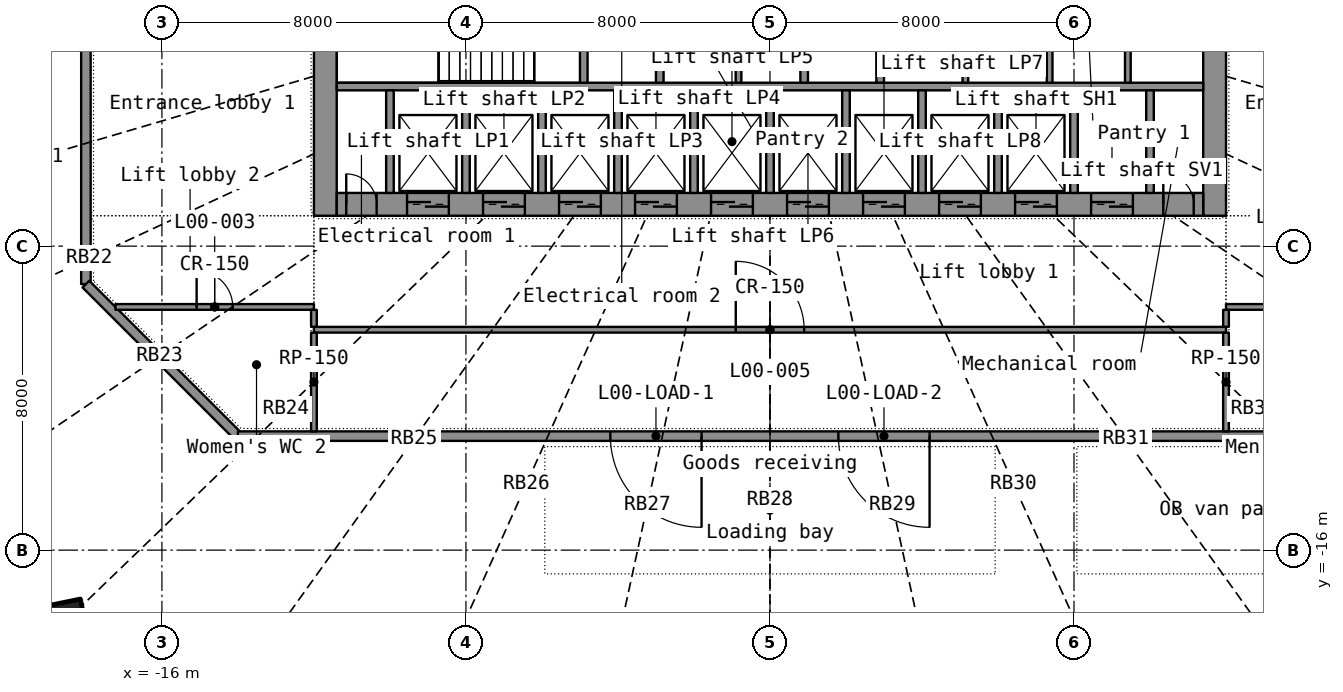
"""IFC4 building model, lengths in metres.
Left out: names, types, materials, properties, quantities, classifications, styles, units other than length and angle.
Written with IfcOpenShell. Run it as: python <this file> out.ifc"""

import sys

from ifc_helpers import new_model, si_unit, direction, frame, frame_2d, origin, origin_2d, place, context, subcontext, project, spatial, rectangle, hollow_rectangle, extrude, element, fill, save


model = new_model("IFC4")
c1 = context("Model", 3, precision=1e-05, world=origin(), true_north=direction((0.0, 1.0)))
c2 = subcontext(c1, "Body", "Model", "MODEL_VIEW")
j1 = project(units=[si_unit("LENGTHUNIT", "METRE"), si_unit("PLANEANGLEUNIT", "RADIAN")], contexts=[c1])
p1 = place(None, origin())
s1 = spatial("IfcSite", under=j1, at=p1, CompositionType="ELEMENT")
p2 = place(p1, origin())
s2 = spatial("IfcBuilding", under=s1, at=p2, CompositionType="ELEMENT")
p3 = place(p2, origin())
s3 = spatial("IfcBuildingStorey", under=s2, at=p3, CompositionType="ELEMENT", Elevation=0.0)
p4 = place(p3, frame((-18.536, -17.878, 0.0), z_axis=(0.022240937, 0.021683171, 0.999517474), x_axis=(-0.827084796, 0.562042845, 0.006211267)))
e1 = element("IfcColumn", 1, at=p4, inside=s3, PredefinedType="COLUMN", context=c2, shape_type="SweptSolid", body=[
    extrude(hollow_rectangle(XDim=1.0, YDim=1.0, WallThickness=0.032, at=origin_2d()), origin(), (0.0, 0.0, 1.0), 7.003),
])
p5 = place(p3, frame((-18.0, -9.0, 0.0), z_axis=(0.0, 0.0, 1.0), x_axis=(0.0, 1.0, 0.0)))
e2 = element("IfcWall", 2, at=p5, inside=s3, PredefinedType="STANDARD", context=c2, shape_type="SweptSolid", body=[
    extrude(rectangle(XDim=18.0, YDim=0.25, at=frame_2d((9.0, 0.0))), origin(), (0.0, 0.0, 1.0), 6.6),
])
p6 = place(p5, frame((7.9, 0.0, 0.0)))
e3 = element("IfcOpeningElement", 3, at=p6, cuts=e2, PredefinedType="OPENING", context=c2, shape_type="SweptSolid", body=[
    extrude(rectangle(XDim=2.2, YDim=2.4, at=frame_2d((1.1, 1.2))), frame((0.0, 0.135, 0.0), z_axis=(0.0, -1.0, 0.0), x_axis=(1.0, 0.0, 0.0)), (0.0, 0.0, 1.0), 0.27),
])
p7 = place(p3, frame((-14.0, -13.0, 0.0), z_axis=(0.0, 0.0, 1.0), x_axis=(-0.707106781, 0.707106781, 0.0)))
e4 = element("IfcWall", 4, at=p7, inside=s3, PredefinedType="STANDARD", context=c2, shape_type="SweptSolid", body=[
    extrude(rectangle(XDim=5.657, YDim=0.25, at=frame_2d((2.828, 0.0))), origin(), (0.0, 0.0, 1.0), 6.6),
])
p8 = place(p3, frame((14.0, -13.0, 0.0), z_axis=(0.0, 0.0, 1.0), x_axis=(-1.0, 0.0, 0.0)))
e5 = element("IfcWall", 5, at=p8, inside=s3, PredefinedType="STANDARD", context=c2, shape_type="SweptSolid", body=[
    extrude(rectangle(XDim=28.0, YDim=0.25, at=frame_2d((14.0, 0.0))), origin(), (0.0, 0.0, 1.0), 6.6),
])
p9 = place(p8, frame((15.8, 0.0, 0.0)))
e6 = element("IfcOpeningElement", 6, at=p9, cuts=e5, PredefinedType="OPENING", context=c2, shape_type="SweptSolid", body=[
    extrude(rectangle(XDim=2.4, YDim=3.0, at=frame_2d((1.2, 1.5))), frame((0.0, 0.135, 0.0), z_axis=(0.0, -1.0, 0.0), x_axis=(1.0, 0.0, 0.0)), (0.0, 0.0, 1.0), 0.27),
])
p10 = place(p8, frame((9.8, 0.0, 0.0)))
e7 = element("IfcOpeningElement", 7, at=p10, cuts=e5, PredefinedType="OPENING", context=c2, shape_type="SweptSolid", body=[
    extrude(rectangle(XDim=2.4, YDim=3.0, at=frame_2d((1.2, 1.5))), frame((0.0, 0.135, 0.0), z_axis=(0.0, -1.0, 0.0), x_axis=(1.0, 0.0, 0.0)), (0.0, 0.0, 1.0), 0.27),
])
p11 = place(p3, frame((-11.7, -7.2, 0.0), z_axis=(0.0, 0.0, 1.0), x_axis=(0.0, 1.0, 0.0)))
e8 = element("IfcWall", 8, at=p11, inside=s3, PredefinedType="SHEAR", context=c2, shape_type="SweptSolid", body=[
    extrude(rectangle(XDim=14.4, YDim=0.6, at=frame_2d((7.2, 0.0))), origin(), (0.0, 0.0, 1.0), 6.6),
])
p12 = place(p11, frame((6.5, 0.0, 0.0)))
e9 = element("IfcOpeningElement", 9, at=p12, cuts=e8, PredefinedType="OPENING", context=c2, shape_type="SweptSolid", body=[
    extrude(rectangle(XDim=1.4, YDim=2.2, at=frame_2d((0.7, 1.1))), frame((0.0, 0.31, 0.0), z_axis=(0.0, -1.0, 0.0), x_axis=(1.0, 0.0, 0.0)), (0.0, 0.0, 1.0), 0.62),
])
p13 = place(p3, frame((11.7, -7.2, 0.0), z_axis=(0.0, 0.0, 1.0), x_axis=(0.0, 1.0, 0.0)))
e10 = element("IfcWall", 10, at=p13, inside=s3, PredefinedType="SHEAR", context=c2, shape_type="SweptSolid", body=[
    extrude(rectangle(XDim=14.4, YDim=0.6, at=frame_2d((7.2, 0.0))), origin(), (0.0, 0.0, 1.0), 6.6),
])
p14 = place(p13, frame((6.5, 0.0, 0.0)))
e11 = element("IfcOpeningElement", 11, at=p14, cuts=e10, PredefinedType="OPENING", context=c2, shape_type="SweptSolid", body=[
    extrude(rectangle(XDim=1.4, YDim=2.2, at=frame_2d((0.7, 1.1))), frame((0.0, 0.31, 0.0), z_axis=(0.0, -1.0, 0.0), x_axis=(1.0, 0.0, 0.0)), (0.0, 0.0, 1.0), 0.62),
])
p15 = place(p3, frame((-11.4, -6.9, 0.0), z_axis=(0.0, 0.0, 1.0), x_axis=(1.0, 0.0, 0.0)))
e12 = element("IfcWall", 12, at=p15, inside=s3, PredefinedType="SHEAR", context=c2, shape_type="SweptSolid", body=[
    extrude(rectangle(XDim=22.8, YDim=0.6, at=frame_2d((11.4, 0.0))), origin(), (0.0, 0.0, 1.0), 6.6),
])
p16 = place(p15, frame((1.85, 0.0, 0.0)))
e13 = element("IfcOpeningElement", 13, at=p16, cuts=e12, PredefinedType="OPENING", context=c2, shape_type="SweptSolid", body=[
    extrude(rectangle(XDim=1.1, YDim=2.2, at=frame_2d((0.55, 1.1))), frame((0.0, 0.31, 0.0), z_axis=(0.0, -1.0, 0.0), x_axis=(1.0, 0.0, 0.0)), (0.0, 0.0, 1.0), 0.62),
])
p17 = place(p15, frame((3.85, 0.0, 0.0)))
e14 = element("IfcOpeningElement", 14, at=p17, cuts=e12, PredefinedType="OPENING", context=c2, shape_type="SweptSolid", body=[
    extrude(rectangle(XDim=1.1, YDim=2.2, at=frame_2d((0.55, 1.1))), frame((0.0, 0.31, 0.0), z_axis=(0.0, -1.0, 0.0), x_axis=(1.0, 0.0, 0.0)), (0.0, 0.0, 1.0), 0.62),
])
p18 = place(p15, frame((5.85, 0.0, 0.0)))
e15 = element("IfcOpeningElement", 15, at=p18, cuts=e12, PredefinedType="OPENING", context=c2, shape_type="SweptSolid", body=[
    extrude(rectangle(XDim=1.1, YDim=2.2, at=frame_2d((0.55, 1.1))), frame((0.0, 0.31, 0.0), z_axis=(0.0, -1.0, 0.0), x_axis=(1.0, 0.0, 0.0)), (0.0, 0.0, 1.0), 0.62),
])
p19 = place(p15, frame((7.85, 0.0, 0.0)))
e16 = element("IfcOpeningElement", 16, at=p19, cuts=e12, PredefinedType="OPENING", context=c2, shape_type="SweptSolid", body=[
    extrude(rectangle(XDim=1.1, YDim=2.2, at=frame_2d((0.55, 1.1))), frame((0.0, 0.31, 0.0), z_axis=(0.0, -1.0, 0.0), x_axis=(1.0, 0.0, 0.0)), (0.0, 0.0, 1.0), 0.62),
])
p20 = place(p15, frame((9.85, 0.0, 0.0)))
e17 = element("IfcOpeningElement", 17, at=p20, cuts=e12, PredefinedType="OPENING", context=c2, shape_type="SweptSolid", body=[
    extrude(rectangle(XDim=1.1, YDim=2.2, at=frame_2d((0.55, 1.1))), frame((0.0, 0.31, 0.0), z_axis=(0.0, -1.0, 0.0), x_axis=(1.0, 0.0, 0.0)), (0.0, 0.0, 1.0), 0.62),
])
p21 = place(p15, frame((11.85, 0.0, 0.0)))
e18 = element("IfcOpeningElement", 18, at=p21, cuts=e12, PredefinedType="OPENING", context=c2, shape_type="SweptSolid", body=[
    extrude(rectangle(XDim=1.1, YDim=2.2, at=frame_2d((0.55, 1.1))), frame((0.0, 0.31, 0.0), z_axis=(0.0, -1.0, 0.0), x_axis=(1.0, 0.0, 0.0)), (0.0, 0.0, 1.0), 0.62),
])
p22 = place(p15, frame((13.85, 0.0, 0.0)))
e19 = element("IfcOpeningElement", 19, at=p22, cuts=e12, PredefinedType="OPENING", context=c2, shape_type="SweptSolid", body=[
    extrude(rectangle(XDim=1.1, YDim=2.2, at=frame_2d((0.55, 1.1))), frame((0.0, 0.31, 0.0), z_axis=(0.0, -1.0, 0.0), x_axis=(1.0, 0.0, 0.0)), (0.0, 0.0, 1.0), 0.62),
])
p23 = place(p15, frame((15.85, 0.0, 0.0)))
e20 = element("IfcOpeningElement", 20, at=p23, cuts=e12, PredefinedType="OPENING", context=c2, shape_type="SweptSolid", body=[
    extrude(rectangle(XDim=1.1, YDim=2.2, at=frame_2d((0.55, 1.1))), frame((0.0, 0.31, 0.0), z_axis=(0.0, -1.0, 0.0), x_axis=(1.0, 0.0, 0.0)), (0.0, 0.0, 1.0), 0.62),
])
p24 = place(p15, frame((17.85, 0.0, 0.0)))
e21 = element("IfcOpeningElement", 21, at=p24, cuts=e12, PredefinedType="OPENING", context=c2, shape_type="SweptSolid", body=[
    extrude(rectangle(XDim=1.1, YDim=2.2, at=frame_2d((0.55, 1.1))), frame((0.0, 0.31, 0.0), z_axis=(0.0, -1.0, 0.0), x_axis=(1.0, 0.0, 0.0)), (0.0, 0.0, 1.0), 0.62),
])
p25 = place(p15, frame((19.85, 0.0, 0.0)))
e22 = element("IfcOpeningElement", 22, at=p25, cuts=e12, PredefinedType="OPENING", context=c2, shape_type="SweptSolid", body=[
    extrude(rectangle(XDim=1.1, YDim=2.2, at=frame_2d((0.55, 1.1))), frame((0.0, 0.31, 0.0), z_axis=(0.0, -1.0, 0.0), x_axis=(1.0, 0.0, 0.0)), (0.0, 0.0, 1.0), 0.62),
])
p26 = place(p15, frame((0.25, 0.0, 0.0)))
e23 = element("IfcOpeningElement", 23, at=p26, cuts=e12, PredefinedType="OPENING", context=c2, shape_type="SweptSolid", body=[
    extrude(rectangle(XDim=0.8, YDim=2.05, at=frame_2d((0.4, 1.025))), frame((0.0, 0.31, 0.0), z_axis=(0.0, -1.0, 0.0), x_axis=(1.0, 0.0, 0.0)), (0.0, 0.0, 1.0), 0.62),
])
p27 = place(p15, frame((21.75, 0.0, 0.0)))
e24 = element("IfcOpeningElement", 24, at=p27, cuts=e12, PredefinedType="OPENING", context=c2, shape_type="SweptSolid", body=[
    extrude(rectangle(XDim=0.8, YDim=2.05, at=frame_2d((0.4, 1.025))), frame((0.0, 0.31, 0.0), z_axis=(0.0, -1.0, 0.0), x_axis=(1.0, 0.0, 0.0)), (0.0, 0.0, 1.0), 0.62),
])
p28 = place(p3, frame((-11.4, -3.8, 0.0), z_axis=(0.0, 0.0, 1.0), x_axis=(1.0, 0.0, 0.0)))
e25 = element("IfcWall", 25, at=p28, inside=s3, PredefinedType="SHEAR", context=c2, shape_type="SweptSolid", body=[
    extrude(rectangle(XDim=22.8, YDim=0.2, at=frame_2d((11.4, 0.0))), origin(), (0.0, 0.0, 1.0), 6.6),
])
for number, where, z_axis, x_axis in (
    (26, (-10.0, -6.6, 0.0), (0.0, 0.0, 1.0), (0.0, 1.0, 0.0)),
    (27, (-8.0, -6.6, 0.0), (0.0, 0.0, 1.0), (0.0, 1.0, 0.0)),
    (28, (-6.0, -6.6, 0.0), (0.0, 0.0, 1.0), (0.0, 1.0, 0.0)),
    (29, (-4.0, -6.6, 0.0), (0.0, 0.0, 1.0), (0.0, 1.0, 0.0)),
    (30, (-2.0, -6.6, 0.0), (0.0, 0.0, 1.0), (0.0, 1.0, 0.0)),
    (31, (0.0, -6.6, 0.0), (0.0, 0.0, 1.0), (0.0, 1.0, 0.0)),
    (32, (2.0, -6.6, 0.0), (0.0, 0.0, 1.0), (0.0, 1.0, 0.0)),
    (33, (4.0, -6.6, 0.0), (0.0, 0.0, 1.0), (0.0, 1.0, 0.0)),
    (34, (6.0, -6.6, 0.0), (0.0, 0.0, 1.0), (0.0, 1.0, 0.0)),
    (35, (8.0, -6.6, 0.0), (0.0, 0.0, 1.0), (0.0, 1.0, 0.0)),
    (36, (10.0, -6.6, 0.0), (0.0, 0.0, 1.0), (0.0, 1.0, 0.0)),
):
    element("IfcWall", number, at=place(p3, frame(where, z_axis=z_axis, x_axis=x_axis)), inside=s3, PredefinedType="SHEAR", context=c2, shape_type="SweptSolid", body=[
        extrude(rectangle(XDim=2.7, YDim=0.2, at=frame_2d((1.35, 0.0))), origin(), (0.0, 0.0, 1.0), 6.6),
    ])
p29 = place(p3, frame((-2.9, -3.7, 0.0), z_axis=(0.0, 0.0, 1.0), x_axis=(0.0, 1.0, 0.0)))
e37 = element("IfcWall", 37, at=p29, inside=s3, PredefinedType="SHEAR", context=c2, shape_type="SweptSolid", body=[
    extrude(rectangle(XDim=7.4, YDim=0.2, at=frame_2d((3.7, 0.0))), origin(), (0.0, 0.0, 1.0), 6.6),
])
p30 = place(p29, frame((3.1, 0.0, 0.0)))
e38 = element("IfcOpeningElement", 38, at=p30, cuts=e37, PredefinedType="OPENING", context=c2, shape_type="SweptSolid", body=[
    extrude(rectangle(XDim=1.2, YDim=2.2, at=frame_2d((0.6, 1.1))), frame((0.0, 0.11, 0.0), z_axis=(0.0, -1.0, 0.0), x_axis=(1.0, 0.0, 0.0)), (0.0, 0.0, 1.0), 0.22),
])
p31 = place(p3, frame((2.9, -3.7, 0.0), z_axis=(0.0, 0.0, 1.0), x_axis=(0.0, 1.0, 0.0)))
e39 = element("IfcWall", 39, at=p31, inside=s3, PredefinedType="SHEAR", context=c2, shape_type="SweptSolid", body=[
    extrude(rectangle(XDim=7.4, YDim=0.2, at=frame_2d((3.7, 0.0))), origin(), (0.0, 0.0, 1.0), 6.6),
])
p32 = place(p31, frame((3.1, 0.0, 0.0)))
e40 = element("IfcOpeningElement", 40, at=p32, cuts=e39, PredefinedType="OPENING", context=c2, shape_type="SweptSolid", body=[
    extrude(rectangle(XDim=1.2, YDim=2.2, at=frame_2d((0.6, 1.1))), frame((0.0, 0.11, 0.0), z_axis=(0.0, -1.0, 0.0), x_axis=(1.0, 0.0, 0.0)), (0.0, 0.0, 1.0), 0.22),
])
for number, where, z_axis, x_axis in (
    (41, (0.9, -3.7, 0.0), (0.0, 0.0, 1.0), (0.0, 1.0, 0.0)),
    (42, (-4.9, -3.7, 0.0), (0.0, 0.0, 1.0), (0.0, 1.0, 0.0)),
):
    element("IfcWall", number, at=place(p3, frame(where, z_axis=z_axis, x_axis=x_axis)), inside=s3, PredefinedType="SHEAR", context=c2, shape_type="SweptSolid", body=[
        extrude(rectangle(XDim=2.35, YDim=0.2, at=frame_2d((1.175, 0.0))), origin(), (0.0, 0.0, 1.0), 6.6),
    ])
for number, where, z_axis, x_axis in (
    (43, (5.142, -3.7, 0.0), (0.0, 0.0, 1.0), (0.0, 1.0, 0.0)),
    (44, (7.359, -3.7, 0.0), (0.0, 0.0, 1.0), (0.0, 1.0, 0.0)),
    (45, (9.417, -3.7, 0.0), (0.0, 0.0, 1.0), (0.0, 1.0, 0.0)),
    (46, (-0.827, -3.7, 0.0), (0.0, 0.0, 1.0), (0.0, 1.0, 0.0)),
):
    element("IfcWall", number, at=place(p3, frame(where, z_axis=z_axis, x_axis=x_axis)), inside=s3, PredefinedType="PARTITIONING", context=c2, shape_type="SweptSolid", body=[
        extrude(rectangle(XDim=2.35, YDim=0.15, at=frame_2d((1.175, 0.0))), origin(), (0.0, 0.0, 1.0), 6.6),
    ])
p33 = place(p3, frame((-12.0, -10.2, 0.0), z_axis=(0.0, 0.0, 1.0), x_axis=(1.0, 0.0, 0.0)))
e47 = element("IfcWall", 47, at=p33, inside=s3, PredefinedType="PARTITIONING", context=c2, shape_type="SweptSolid", body=[
    extrude(rectangle(XDim=24.0, YDim=0.15, at=frame_2d((12.0, 0.0))), origin(), (0.0, 0.0, 1.0), 5.6),
])
p34 = place(p33, frame((11.1, 0.0, 0.0)))
e48 = element("IfcOpeningElement", 48, at=p34, cuts=e47, PredefinedType="OPENING", context=c2, shape_type="SweptSolid", body=[
    extrude(rectangle(XDim=1.8, YDim=2.4, at=frame_2d((0.9, 1.2))), frame((0.0, 0.085, 0.0), z_axis=(0.0, -1.0, 0.0), x_axis=(1.0, 0.0, 0.0)), (0.0, 0.0, 1.0), 0.17),
])
p35 = place(p3, frame((-17.223, -9.6, 0.0), z_axis=(0.0, 0.0, 1.0), x_axis=(1.0, 0.0, 0.0)))
e49 = element("IfcWall", 49, at=p35, inside=s3, PredefinedType="PARTITIONING", context=c2, shape_type="SweptSolid", body=[
    extrude(rectangle(XDim=5.223, YDim=0.15, at=frame_2d((2.612, 0.0))), origin(), (0.0, 0.0, 1.0), 5.6),
])
p36 = place(p35, frame((2.137, 0.0, 0.0)))
e50 = element("IfcOpeningElement", 50, at=p36, cuts=e49, PredefinedType="OPENING", context=c2, shape_type="SweptSolid", body=[
    extrude(rectangle(XDim=0.95, YDim=2.15, at=frame_2d((0.475, 1.075))), frame((0.0, 0.085, 0.0), z_axis=(0.0, -1.0, 0.0), x_axis=(1.0, 0.0, 0.0)), (0.0, 0.0, 1.0), 0.17),
])
p37 = place(p3, frame((12.0, -9.6, 0.0), z_axis=(0.0, 0.0, 1.0), x_axis=(1.0, 0.0, 0.0)))
e51 = element("IfcWall", 51, at=p37, inside=s3, PredefinedType="PARTITIONING", context=c2, shape_type="SweptSolid", body=[
    extrude(rectangle(XDim=5.223, YDim=0.15, at=frame_2d((2.612, 0.0))), origin(), (0.0, 0.0, 1.0), 5.6),
])
p38 = place(p37, frame((2.137, 0.0, 0.0)))
e52 = element("IfcOpeningElement", 52, at=p38, cuts=e51, PredefinedType="OPENING", context=c2, shape_type="SweptSolid", body=[
    extrude(rectangle(XDim=0.95, YDim=2.15, at=frame_2d((0.475, 1.075))), frame((0.0, 0.085, 0.0), z_axis=(0.0, -1.0, 0.0), x_axis=(1.0, 0.0, 0.0)), (0.0, 0.0, 1.0), 0.17),
])
for number, where, z_axis, x_axis in (
    (53, (-12.0, -12.875, 0.0), (0.0, 0.0, 1.0), (0.0, 1.0, 0.0)),
    (54, (12.0, -10.277, 0.0), (0.0, 0.0, 1.0), (0.0, -1.0, 0.0)),
):
    element("IfcWall", number, at=place(p3, frame(where, z_axis=z_axis, x_axis=x_axis)), inside=s3, PredefinedType="PARTITIONING", context=c2, shape_type="SweptSolid", body=[
        extrude(rectangle(XDim=2.598, YDim=0.15, at=frame_2d((1.299, 0.0))), origin(), (0.0, 0.0, 1.0), 5.6),
    ])
for number, where, z_axis, x_axis in (
    (55, (-12.0, -9.677, 0.0), (0.0, 0.0, 1.0), (0.0, -1.0, 0.0)),
    (56, (12.0, -10.123, 0.0), (0.0, 0.0, 1.0), (0.0, 1.0, 0.0)),
):
    element("IfcWall", number, at=place(p3, frame(where, z_axis=z_axis, x_axis=x_axis)), inside=s3, PredefinedType="PARTITIONING", context=c2, shape_type="SweptSolid", body=[
        extrude(rectangle(XDim=0.446, YDim=0.15, at=frame_2d((0.223, 0.0))), origin(), (0.0, 0.0, 1.0), 5.6),
    ])
p39 = place(p9, origin())
e57 = element("IfcDoor", 57, at=p39, inside=s3, OperationType="ROLLINGUP", PredefinedType="GATE", context=c2, shape_type="SweptSolid", body=[
    extrude(rectangle(XDim=2.4, YDim=3.0, at=frame_2d((1.2, 1.5))), frame((0.0, 0.025, 0.0), z_axis=(0.0, -1.0, 0.0), x_axis=(1.0, 0.0, 0.0)), (0.0, 0.0, 1.0), 0.05),
])
fill(e6, e57)
p40 = place(p10, origin())
e58 = element("IfcDoor", 58, at=p40, inside=s3, OperationType="ROLLINGUP", PredefinedType="GATE", context=c2, shape_type="SweptSolid", body=[
    extrude(rectangle(XDim=2.4, YDim=3.0, at=frame_2d((1.2, 1.5))), frame((0.0, 0.025, 0.0), z_axis=(0.0, -1.0, 0.0), x_axis=(1.0, 0.0, 0.0)), (0.0, 0.0, 1.0), 0.05),
])
fill(e7, e58)
p41 = place(p16, origin())
e59 = element("IfcDoor", 59, at=p41, inside=s3, OperationType="DOUBLE_DOOR_SLIDING", PredefinedType="DOOR", context=c2, shape_type="SweptSolid", body=[
    extrude(rectangle(XDim=1.1, YDim=2.2, at=frame_2d((0.55, 1.1))), frame((0.0, 0.025, 0.0), z_axis=(0.0, -1.0, 0.0), x_axis=(1.0, 0.0, 0.0)), (0.0, 0.0, 1.0), 0.05),
])
fill(e13, e59)
p42 = place(p17, origin())
e60 = element("IfcDoor", 60, at=p42, inside=s3, OperationType="DOUBLE_DOOR_SLIDING", PredefinedType="DOOR", context=c2, shape_type="SweptSolid", body=[
    extrude(rectangle(XDim=1.1, YDim=2.2, at=frame_2d((0.55, 1.1))), frame((0.0, 0.025, 0.0), z_axis=(0.0, -1.0, 0.0), x_axis=(1.0, 0.0, 0.0)), (0.0, 0.0, 1.0), 0.05),
])
fill(e14, e60)
p43 = place(p18, origin())
e61 = element("IfcDoor", 61, at=p43, inside=s3, OperationType="DOUBLE_DOOR_SLIDING", PredefinedType="DOOR", context=c2, shape_type="SweptSolid", body=[
    extrude(rectangle(XDim=1.1, YDim=2.2, at=frame_2d((0.55, 1.1))), frame((0.0, 0.025, 0.0), z_axis=(0.0, -1.0, 0.0), x_axis=(1.0, 0.0, 0.0)), (0.0, 0.0, 1.0), 0.05),
])
fill(e15, e61)
p44 = place(p19, origin())
e62 = element("IfcDoor", 62, at=p44, inside=s3, OperationType="DOUBLE_DOOR_SLIDING", PredefinedType="DOOR", context=c2, shape_type="SweptSolid", body=[
    extrude(rectangle(XDim=1.1, YDim=2.2, at=frame_2d((0.55, 1.1))), frame((0.0, 0.025, 0.0), z_axis=(0.0, -1.0, 0.0), x_axis=(1.0, 0.0, 0.0)), (0.0, 0.0, 1.0), 0.05),
])
fill(e16, e62)
p45 = place(p20, origin())
e63 = element("IfcDoor", 63, at=p45, inside=s3, OperationType="DOUBLE_DOOR_SLIDING", PredefinedType="DOOR", context=c2, shape_type="SweptSolid", body=[
    extrude(rectangle(XDim=1.1, YDim=2.2, at=frame_2d((0.55, 1.1))), frame((0.0, 0.025, 0.0), z_axis=(0.0, -1.0, 0.0), x_axis=(1.0, 0.0, 0.0)), (0.0, 0.0, 1.0), 0.05),
])
fill(e17, e63)
p46 = place(p21, origin())
e64 = element("IfcDoor", 64, at=p46, inside=s3, OperationType="DOUBLE_DOOR_SLIDING", PredefinedType="DOOR", context=c2, shape_type="SweptSolid", body=[
    extrude(rectangle(XDim=1.1, YDim=2.2, at=frame_2d((0.55, 1.1))), frame((0.0, 0.025, 0.0), z_axis=(0.0, -1.0, 0.0), x_axis=(1.0, 0.0, 0.0)), (0.0, 0.0, 1.0), 0.05),
])
fill(e18, e64)
p47 = place(p22, origin())
e65 = element("IfcDoor", 65, at=p47, inside=s3, OperationType="DOUBLE_DOOR_SLIDING", PredefinedType="DOOR", context=c2, shape_type="SweptSolid", body=[
    extrude(rectangle(XDim=1.1, YDim=2.2, at=frame_2d((0.55, 1.1))), frame((0.0, 0.025, 0.0), z_axis=(0.0, -1.0, 0.0), x_axis=(1.0, 0.0, 0.0)), (0.0, 0.0, 1.0), 0.05),
])
fill(e19, e65)
p48 = place(p23, origin())
e66 = element("IfcDoor", 66, at=p48, inside=s3, OperationType="DOUBLE_DOOR_SLIDING", PredefinedType="DOOR", context=c2, shape_type="SweptSolid", body=[
    extrude(rectangle(XDim=1.1, YDim=2.2, at=frame_2d((0.55, 1.1))), frame((0.0, 0.025, 0.0), z_axis=(0.0, -1.0, 0.0), x_axis=(1.0, 0.0, 0.0)), (0.0, 0.0, 1.0), 0.05),
])
fill(e20, e66)
p49 = place(p24, origin())
e67 = element("IfcDoor", 67, at=p49, inside=s3, OperationType="DOUBLE_DOOR_SLIDING", PredefinedType="DOOR", context=c2, shape_type="SweptSolid", body=[
    extrude(rectangle(XDim=1.1, YDim=2.2, at=frame_2d((0.55, 1.1))), frame((0.0, 0.025, 0.0), z_axis=(0.0, -1.0, 0.0), x_axis=(1.0, 0.0, 0.0)), (0.0, 0.0, 1.0), 0.05),
])
fill(e21, e67)
p50 = place(p25, origin())
e68 = element("IfcDoor", 68, at=p50, inside=s3, OperationType="DOUBLE_DOOR_SLIDING", PredefinedType="DOOR", context=c2, shape_type="SweptSolid", body=[
    extrude(rectangle(XDim=1.1, YDim=2.2, at=frame_2d((0.55, 1.1))), frame((0.0, 0.025, 0.0), z_axis=(0.0, -1.0, 0.0), x_axis=(1.0, 0.0, 0.0)), (0.0, 0.0, 1.0), 0.05),
])
fill(e22, e68)
p51 = place(p26, origin())
e69 = element("IfcDoor", 69, at=p51, inside=s3, OperationType="SINGLE_SWING_LEFT", PredefinedType="DOOR", context=c2, shape_type="SweptSolid", body=[
    extrude(rectangle(XDim=0.8, YDim=2.05, at=frame_2d((0.4, 1.025))), frame((0.0, 0.025, 0.0), z_axis=(0.0, -1.0, 0.0), x_axis=(1.0, 0.0, 0.0)), (0.0, 0.0, 1.0), 0.05),
])
fill(e23, e69)
p52 = place(p27, origin())
e70 = element("IfcDoor", 70, at=p52, inside=s3, OperationType="SINGLE_SWING_LEFT", PredefinedType="DOOR", context=c2, shape_type="SweptSolid", body=[
    extrude(rectangle(XDim=0.8, YDim=2.05, at=frame_2d((0.4, 1.025))), frame((0.0, 0.025, 0.0), z_axis=(0.0, -1.0, 0.0), x_axis=(1.0, 0.0, 0.0)), (0.0, 0.0, 1.0), 0.05),
])
fill(e24, e70)
p53 = place(p36, origin())
e71 = element("IfcDoor", 71, at=p53, inside=s3, OperationType="SINGLE_SWING_LEFT", PredefinedType="DOOR", context=c2, shape_type="SweptSolid", body=[
    extrude(rectangle(XDim=0.95, YDim=2.15, at=frame_2d((0.475, 1.075))), frame((0.0, 0.025, 0.0), z_axis=(0.0, -1.0, 0.0), x_axis=(1.0, 0.0, 0.0)), (0.0, 0.0, 1.0), 0.05),
])
fill(e50, e71)
p54 = place(p34, origin())
e72 = element("IfcDoor", 72, at=p54, inside=s3, OperationType="DOUBLE_DOOR_SINGLE_SWING", PredefinedType="DOOR", context=c2, shape_type="SweptSolid", body=[
    extrude(rectangle(XDim=1.8, YDim=2.4, at=frame_2d((0.9, 1.2))), frame((0.0, 0.025, 0.0), z_axis=(0.0, -1.0, 0.0), x_axis=(1.0, 0.0, 0.0)), (0.0, 0.0, 1.0), 0.05),
])
fill(e48, e72)
save(model, sys.argv[1])
